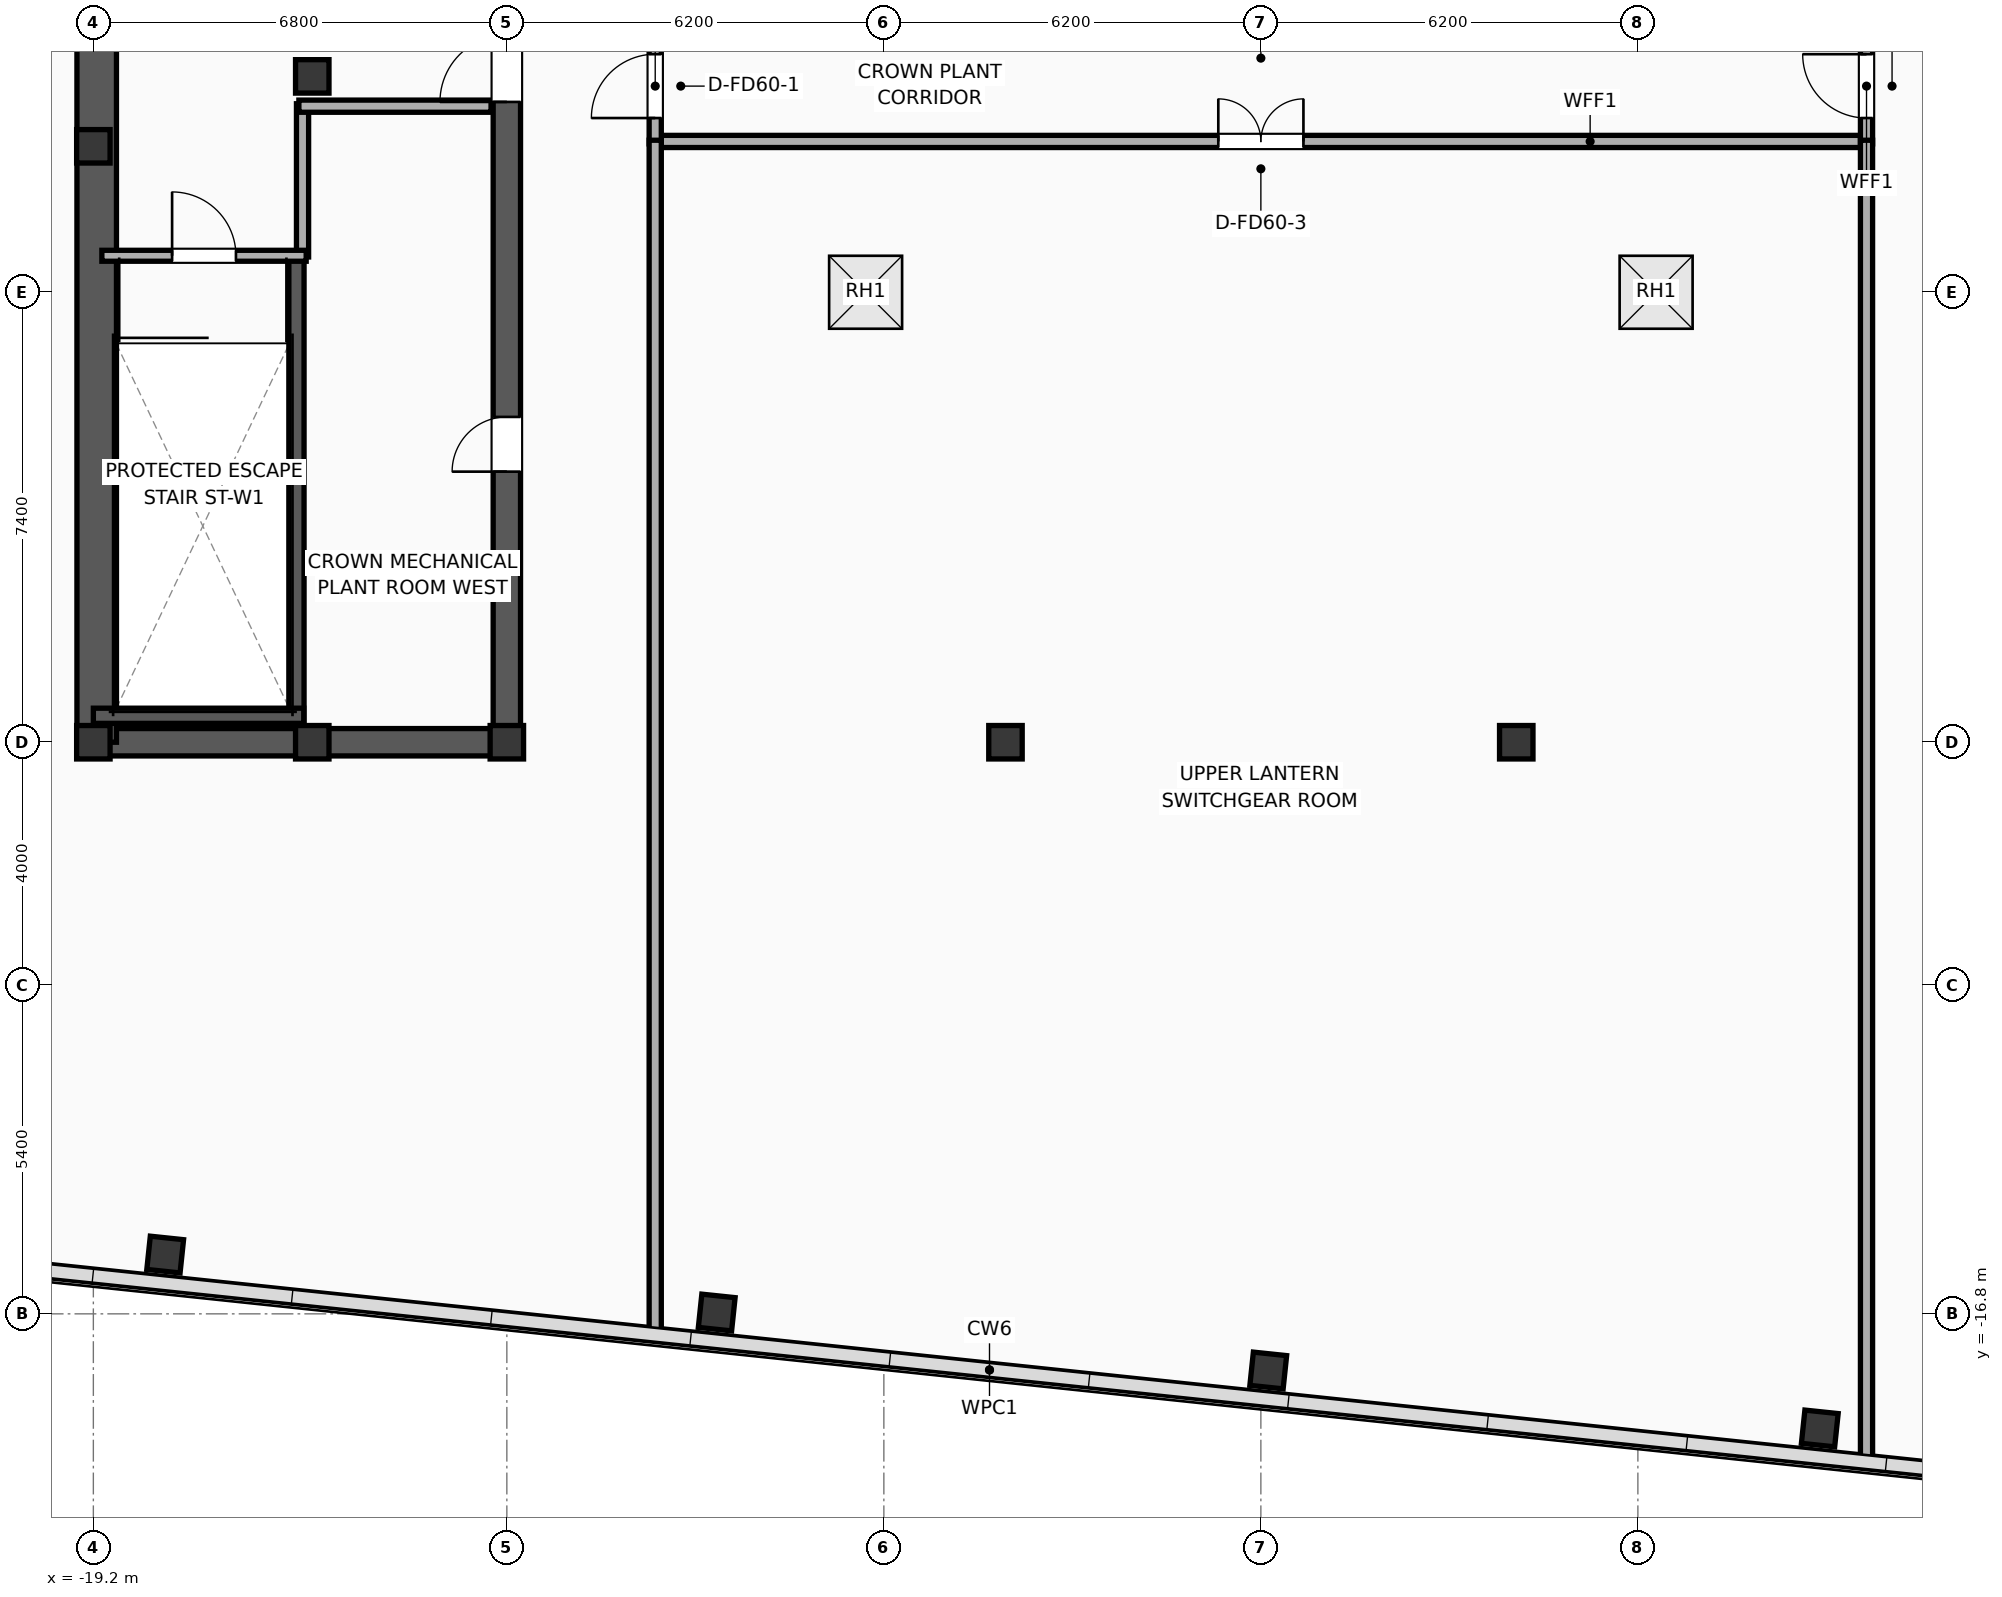
"""IFC4 building model, lengths in metres.
Left out: names, types, materials, properties, quantities, classifications, styles, units other than length and angle.
Written with IfcOpenShell. Run it as: python <this file> out.ifc"""

import sys

from ifc_helpers import new_model, si_unit, direction, frame, frame_2d, origin, origin_2d, place, context, subcontext, project, spatial, rectangle, hollow_rectangle, extrude, element, fill, save


model = new_model("IFC4")
c1 = context("Model", 3, precision=1e-05, world=origin(), true_north=direction((0.0, 1.0)))
c2 = subcontext(c1, "Body", "Model", "MODEL_VIEW")
j1 = project(units=[si_unit("LENGTHUNIT", "METRE"), si_unit("PLANEANGLEUNIT", "RADIAN")], contexts=[c1])
p1 = place(None, origin())
s1 = spatial("IfcSite", under=j1, at=p1, CompositionType="ELEMENT")
p2 = place(p1, origin())
s2 = spatial("IfcBuilding", under=s1, at=p2, CompositionType="ELEMENT")
p3 = place(p2, frame((0.0, 0.0, 337.2)))
s3 = spatial("IfcBuildingStorey", under=s2, at=p3, CompositionType="ELEMENT", Elevation=337.2)
for number, where, z_axis, x_axis in (
    (1, (-19.2, -7.4, 0.0), (0.0, 0.0, 1.0), (1.0, 0.0, 0.0)),
    (2, (-19.2, 2.4, 0.0), (0.0, 0.0, 1.0), (1.0, 0.0, 0.0)),
    (3, (-15.6, -7.4, 0.0), (0.0, 0.0, 1.0), (1.0, 0.0, 0.0)),
    (4, (-12.4, -7.4, 0.0), (0.0, 0.0, 1.0), (1.0, 0.0, 0.0)),
    (5, (-15.6, 3.55, 0.0), (0.0, 0.0, 1.0), (1.0, 0.0, 0.0)),
):
    element("IfcColumn", number, at=place(p3, frame(where, z_axis=z_axis, x_axis=x_axis)), inside=s3, PredefinedType="COLUMN", context=c2, shape_type="SweptSolid", body=[
        extrude(hollow_rectangle(XDim=0.55, YDim=0.55, WallThickness=0.022, at=origin_2d()), origin(), (0.0, 0.0, 1.0), 5.22),
    ])
p4 = place(p3, frame((-19.425, -7.4, 0.0), z_axis=(0.0, 0.0, 1.0), x_axis=(1.0, 0.0, 0.0)))
e6 = element("IfcWall", 6, at=p4, inside=s3, PredefinedType="SHEAR", context=c2, shape_type="SweptSolid", body=[
    extrude(rectangle(XDim=7.25, YDim=0.45, at=frame_2d((3.625, 0.0))), origin(), (0.0, 0.0, 1.0), 4.96),
])
p5 = place(p3, frame((-19.145, -7.4, 0.0), z_axis=(0.0, 0.0, 1.0), x_axis=(0.0, 1.0, 0.0)))
e7 = element("IfcWall", 7, at=p5, inside=s3, PredefinedType="SHEAR", context=c2, shape_type="SweptSolid", body=[
    extrude(rectangle(XDim=14.8, YDim=0.65, at=frame_2d((7.4, 0.0))), origin(), (0.0, 0.0, 1.0), 4.96),
])
p6 = place(p3, frame((-12.4, -7.4, 0.0), z_axis=(0.0, 0.0, 1.0), x_axis=(0.0, 1.0, 0.0)))
e8 = element("IfcWall", 8, at=p6, inside=s3, PredefinedType="SHEAR", context=c2, shape_type="SweptSolid", body=[
    extrude(rectangle(XDim=14.8, YDim=0.45, at=frame_2d((7.4, 0.0))), origin(), (0.0, 0.0, 1.0), 4.96),
])
p7 = place(p6, frame((10.53, 0.0, 0.0)))
e9 = element("IfcOpeningElement", 9, at=p7, cuts=e8, PredefinedType="OPENING", context=c2, shape_type="SweptSolid", body=[
    extrude(rectangle(XDim=1.1, YDim=2.05, at=frame_2d((0.55, 1.025))), frame((0.0, 0.235, 0.0), z_axis=(0.0, -1.0, 0.0), x_axis=(1.0, 0.0, 0.0)), (0.0, 0.0, 1.0), 0.47),
])
p8 = place(p6, frame((4.45, 0.0, 0.0)))
e10 = element("IfcOpeningElement", 10, at=p8, cuts=e8, PredefinedType="OPENING", context=c2, shape_type="SweptSolid", body=[
    extrude(rectangle(XDim=0.9, YDim=2.05, at=frame_2d((0.45, 1.025))), frame((0.0, 0.235, 0.0), z_axis=(0.0, -1.0, 0.0), x_axis=(1.0, 0.0, 0.0)), (0.0, 0.0, 1.0), 0.47),
])
p9 = place(p3, frame((-15.86, -7.085, 0.0), z_axis=(0.0, 0.0, 1.0), x_axis=(0.0, 1.0, 0.0)))
e11 = element("IfcWall", 11, at=p9, inside=s3, PredefinedType="SOLIDWALL", context=c2, shape_type="SweptSolid", body=[
    extrude(rectangle(XDim=7.685, YDim=0.25, at=frame_2d((3.843, 0.0))), origin(), (0.0, 0.0, 1.0), 4.96),
])
p10 = place(p3, frame((-19.2, -6.965, 0.0), z_axis=(0.0, 0.0, 1.0), x_axis=(1.0, 0.0, 0.0)))
e12 = element("IfcWall", 12, at=p10, inside=s3, PredefinedType="SOLIDWALL", context=c2, shape_type="SweptSolid", body=[
    extrude(rectangle(XDim=3.46, YDim=0.25, at=frame_2d((1.73, 0.0))), origin(), (0.0, 0.0, 1.0), 4.96),
])
for number, where, z_axis, x_axis in (
    (13, (-4.2, -7.4, 0.0), (0.0, 0.0, 1.0), (1.0, 0.0, 0.0)),
    (14, (4.2, -7.4, 0.0), (0.0, 0.0, 1.0), (1.0, 0.0, 0.0)),
):
    element("IfcColumn", number, at=place(p3, frame(where, z_axis=z_axis, x_axis=x_axis)), inside=s3, PredefinedType="COLUMN", context=c2, shape_type="SweptSolid", body=[
        extrude(hollow_rectangle(XDim=0.55, YDim=0.55, WallThickness=0.022, at=origin_2d()), origin(), (0.0, 0.0, 1.0), 5.22),
    ])
for number, where, z_axis, x_axis in (
    (15, (-18.019, -15.825, 0.0), (0.0, 0.0, 1.0), (0.995, -0.105, 0.0)),
    (16, (-8.948, -16.778, 0.0), (0.0, 0.0, 1.0), (0.995, -0.105, 0.0)),
    (17, (0.121, -17.732, 0.0), (0.0, 0.0, 1.0), (0.995, -0.105, 0.0)),
    (18, (9.191, -18.685, 0.0), (0.0, 0.0, 1.0), (0.995, -0.105, 0.0)),
):
    element("IfcColumn", number, at=place(p3, frame(where, z_axis=z_axis, x_axis=x_axis)), inside=s3, PredefinedType="COLUMN", context=c2, shape_type="SweptSolid", body=[
        extrude(hollow_rectangle(XDim=0.55, YDim=0.55, WallThickness=0.022, at=origin_2d()), origin(), (0.0, 0.0, 1.0), 5.265),
    ])
p11 = place(p3, frame((18.195, -20.104, 0.0), z_axis=(0.0, 0.0, 1.0), x_axis=(-0.994522116558, 0.104526358762, 0.0)))
e19 = element("IfcWall", 19, at=p11, inside=s3, PredefinedType="PARAPET", context=c2, shape_type="SweptSolid", body=[
    extrude(rectangle(XDim=45.564, YDim=0.22, at=frame_2d((22.782, 0.0))), origin(), (0.0, 0.0, 1.0), 1.2),
])
p12 = place(p3, frame((-15.76, 0.58, 0.0), z_axis=(0.0, 0.0, 1.0), x_axis=(0.0, 1.0, 0.0)))
e20 = element("IfcWall", 20, at=p12, inside=s3, PredefinedType="PARTITIONING", context=c2, shape_type="SweptSolid", body=[
    extrude(rectangle(XDim=2.52, YDim=0.2, at=frame_2d((1.26, 0.0))), origin(), (0.0, 0.0, 1.0), 4.96),
])
p13 = place(p3, frame((-15.82, 3.06, 0.0), z_axis=(0.0, 0.0, 1.0), x_axis=(1.0, 0.0, 0.0)))
e21 = element("IfcWall", 21, at=p13, inside=s3, PredefinedType="PARTITIONING", context=c2, shape_type="SweptSolid", body=[
    extrude(rectangle(XDim=3.16, YDim=0.2, at=frame_2d((1.58, 0.0))), origin(), (0.0, 0.0, 1.0), 4.96),
])
p14 = place(p3, frame((-19.06, 0.6, 0.0), z_axis=(0.0, 0.0, 1.0), x_axis=(1.0, 0.0, 0.0)))
e22 = element("IfcWall", 22, at=p14, inside=s3, PredefinedType="PARTITIONING", context=c2, shape_type="SweptSolid", body=[
    extrude(rectangle(XDim=3.36, YDim=0.18, at=frame_2d((1.68, 0.0))), origin(), (0.0, 0.0, 1.0), 4.96),
])
p15 = place(p14, frame((1.155, 0.0, 0.0)))
e23 = element("IfcOpeningElement", 23, at=p15, cuts=e22, PredefinedType="OPENING", context=c2, shape_type="SweptSolid", body=[
    extrude(rectangle(XDim=1.05, YDim=2.05, at=frame_2d((0.525, 1.025))), frame((0.0, 0.1, 0.0), z_axis=(0.0, -1.0, 0.0), x_axis=(1.0, 0.0, 0.0)), (0.0, 0.0, 1.0), 0.2),
])
p16 = place(p3, frame((-9.98, 2.48, 0.0), z_axis=(0.0, 0.0, 1.0), x_axis=(1.0, 0.0, 0.0)))
e24 = element("IfcWall", 24, at=p16, inside=s3, PredefinedType="PARTITIONING", context=c2, shape_type="SweptSolid", body=[
    extrude(rectangle(XDim=19.96, YDim=0.2, at=frame_2d((9.98, 0.0))), origin(), (0.0, 0.0, 1.0), 4.53),
])
p17 = place(p16, frame((9.28, 0.0, 0.0)))
e25 = element("IfcOpeningElement", 25, at=p17, cuts=e24, PredefinedType="OPENING", context=c2, shape_type="SweptSolid", body=[
    extrude(rectangle(XDim=1.4, YDim=2.05, at=frame_2d((0.7, 1.025))), frame((0.0, 0.11, 0.0), z_axis=(0.0, -1.0, 0.0), x_axis=(1.0, 0.0, 0.0)), (0.0, 0.0, 1.0), 0.22),
])
p18 = place(p3, frame((-9.96, 2.44, 0.0), z_axis=(0.0, 0.0, 1.0), x_axis=(0.0, 1.0, 0.0)))
e26 = element("IfcWall", 26, at=p18, inside=s3, PredefinedType="PARTITIONING", context=c2, shape_type="SweptSolid", body=[
    extrude(rectangle(XDim=1.9, YDim=0.2, at=frame_2d((0.95, 0.0))), origin(), (0.0, 0.0, 1.0), 4.96),
])
p19 = place(p18, frame((0.425, 0.0, 0.0)))
e27 = element("IfcOpeningElement", 27, at=p19, cuts=e26, PredefinedType="OPENING", context=c2, shape_type="SweptSolid", body=[
    extrude(rectangle(XDim=1.05, YDim=2.05, at=frame_2d((0.525, 1.025))), frame((0.0, 0.11, 0.0), z_axis=(0.0, -1.0, 0.0), x_axis=(1.0, 0.0, 0.0)), (0.0, 0.0, 1.0), 0.22),
])
p20 = place(p3, frame((9.96, 2.44, 0.0), z_axis=(0.0, 0.0, 1.0), x_axis=(0.0, 1.0, 0.0)))
e28 = element("IfcWall", 28, at=p20, inside=s3, PredefinedType="PARTITIONING", context=c2, shape_type="SweptSolid", body=[
    extrude(rectangle(XDim=1.9, YDim=0.2, at=frame_2d((0.95, 0.0))), origin(), (0.0, 0.0, 1.0), 4.96),
])
p21 = place(p20, frame((0.425, 0.0, 0.0)))
e29 = element("IfcOpeningElement", 29, at=p21, cuts=e28, PredefinedType="OPENING", context=c2, shape_type="SweptSolid", body=[
    extrude(rectangle(XDim=1.05, YDim=2.05, at=frame_2d((0.525, 1.025))), frame((0.0, 0.11, 0.0), z_axis=(0.0, -1.0, 0.0), x_axis=(1.0, 0.0, 0.0)), (0.0, 0.0, 1.0), 0.22),
])
p22 = place(p3, frame((-9.96, -17.125, 0.0), z_axis=(0.0, 0.0, 1.0), x_axis=(0.0, 1.0, 0.0)))
e30 = element("IfcWall", 30, at=p22, inside=s3, PredefinedType="PARTITIONING", context=c2, shape_type="SweptSolid", body=[
    extrude(rectangle(XDim=19.625, YDim=0.2, at=frame_2d((9.812, 0.0))), origin(), (0.0, 0.0, 1.0), 4.4),
])
p23 = place(p3, frame((9.96, -19.218, 0.0), z_axis=(0.0, 0.0, 1.0), x_axis=(0.0, 1.0, 0.0)))
e31 = element("IfcWall", 31, at=p23, inside=s3, PredefinedType="PARTITIONING", context=c2, shape_type="SweptSolid", body=[
    extrude(rectangle(XDim=21.718, YDim=0.2, at=frame_2d((10.859, 0.0))), origin(), (0.0, 0.0, 1.0), 4.4),
])
p24 = place(p2, frame((0.0, 0.0, 342.5)))
p25 = place(p24, frame((0.0, 0.0, -0.34)))
p26 = place(p25, frame((-6.5, 0.0, 0.0)))
p27 = place(p26, frame((0.0, 0.0, 0.29)))
e32 = element("IfcWindow", 32, at=p27, inside=s3, PartitioningType="SINGLE_PANEL", PredefinedType="SKYLIGHT", context=c2, shape_type="SweptSolid", body=[
    extrude(rectangle(XDim=1.2, YDim=1.2, at=origin_2d()), origin(), (0.0, 0.0, 1.0), 0.05),
])
p28 = place(p25, frame((6.5, 0.0, 0.0)))
p29 = place(p28, frame((0.0, 0.0, 0.29)))
e33 = element("IfcWindow", 33, at=p29, inside=s3, PartitioningType="SINGLE_PANEL", PredefinedType="SKYLIGHT", context=c2, shape_type="SweptSolid", body=[
    extrude(rectangle(XDim=1.2, YDim=1.2, at=origin_2d()), origin(), (0.0, 0.0, 1.0), 0.05),
])
p30 = place(p15, origin())
e34 = element("IfcDoor", 34, at=p30, inside=s3, OperationType="SINGLE_SWING_LEFT", PredefinedType="DOOR", context=c2, shape_type="SweptSolid", body=[
    extrude(rectangle(XDim=1.05, YDim=2.05, at=frame_2d((0.525, 1.025))), frame((0.0, 0.025, 0.0), z_axis=(0.0, -1.0, 0.0), x_axis=(1.0, 0.0, 0.0)), (0.0, 0.0, 1.0), 0.05),
])
fill(e23, e34)
p31 = place(p17, origin())
e35 = element("IfcDoor", 35, at=p31, inside=s3, OperationType="DOUBLE_DOOR_SINGLE_SWING", PredefinedType="DOOR", context=c2, shape_type="SweptSolid", body=[
    extrude(rectangle(XDim=1.4, YDim=2.05, at=frame_2d((0.7, 1.025))), frame((0.0, 0.025, 0.0), z_axis=(0.0, -1.0, 0.0), x_axis=(1.0, 0.0, 0.0)), (0.0, 0.0, 1.0), 0.05),
])
fill(e25, e35)
p32 = place(p19, origin())
e36 = element("IfcDoor", 36, at=p32, inside=s3, OperationType="SINGLE_SWING_LEFT", PredefinedType="DOOR", context=c2, shape_type="SweptSolid", body=[
    extrude(rectangle(XDim=1.05, YDim=2.05, at=frame_2d((0.525, 1.025))), frame((0.0, 0.025, 0.0), z_axis=(0.0, -1.0, 0.0), x_axis=(1.0, 0.0, 0.0)), (0.0, 0.0, 1.0), 0.05),
])
fill(e27, e36)
p33 = place(p21, origin())
e37 = element("IfcDoor", 37, at=p33, inside=s3, OperationType="SINGLE_SWING_RIGHT", PredefinedType="DOOR", context=c2, shape_type="SweptSolid", body=[
    extrude(rectangle(XDim=1.05, YDim=2.05, at=frame_2d((0.525, 1.025))), frame((0.0, 0.025, 0.0), z_axis=(0.0, -1.0, 0.0), x_axis=(1.0, 0.0, 0.0)), (0.0, 0.0, 1.0), 0.05),
])
fill(e29, e37)
p34 = place(p7, origin())
e38 = element("IfcDoor", 38, at=p34, inside=s3, OperationType="SINGLE_SWING_LEFT", PredefinedType="DOOR", context=c2, shape_type="SweptSolid", body=[
    extrude(rectangle(XDim=1.1, YDim=2.05, at=frame_2d((0.55, 1.025))), frame((0.0, 0.025, 0.0), z_axis=(0.0, -1.0, 0.0), x_axis=(1.0, 0.0, 0.0)), (0.0, 0.0, 1.0), 0.05),
])
fill(e9, e38)
p35 = place(p8, origin())
e39 = element("IfcDoor", 39, at=p35, inside=s3, OperationType="SINGLE_SWING_LEFT", PredefinedType="DOOR", context=c2, shape_type="SweptSolid", body=[
    extrude(rectangle(XDim=0.9, YDim=2.05, at=frame_2d((0.45, 1.025))), frame((0.0, 0.025, 0.0), z_axis=(0.0, -1.0, 0.0), x_axis=(1.0, 0.0, 0.0)), (0.0, 0.0, 1.0), 0.05),
])
fill(e10, e39)
save(model, sys.argv[1])
